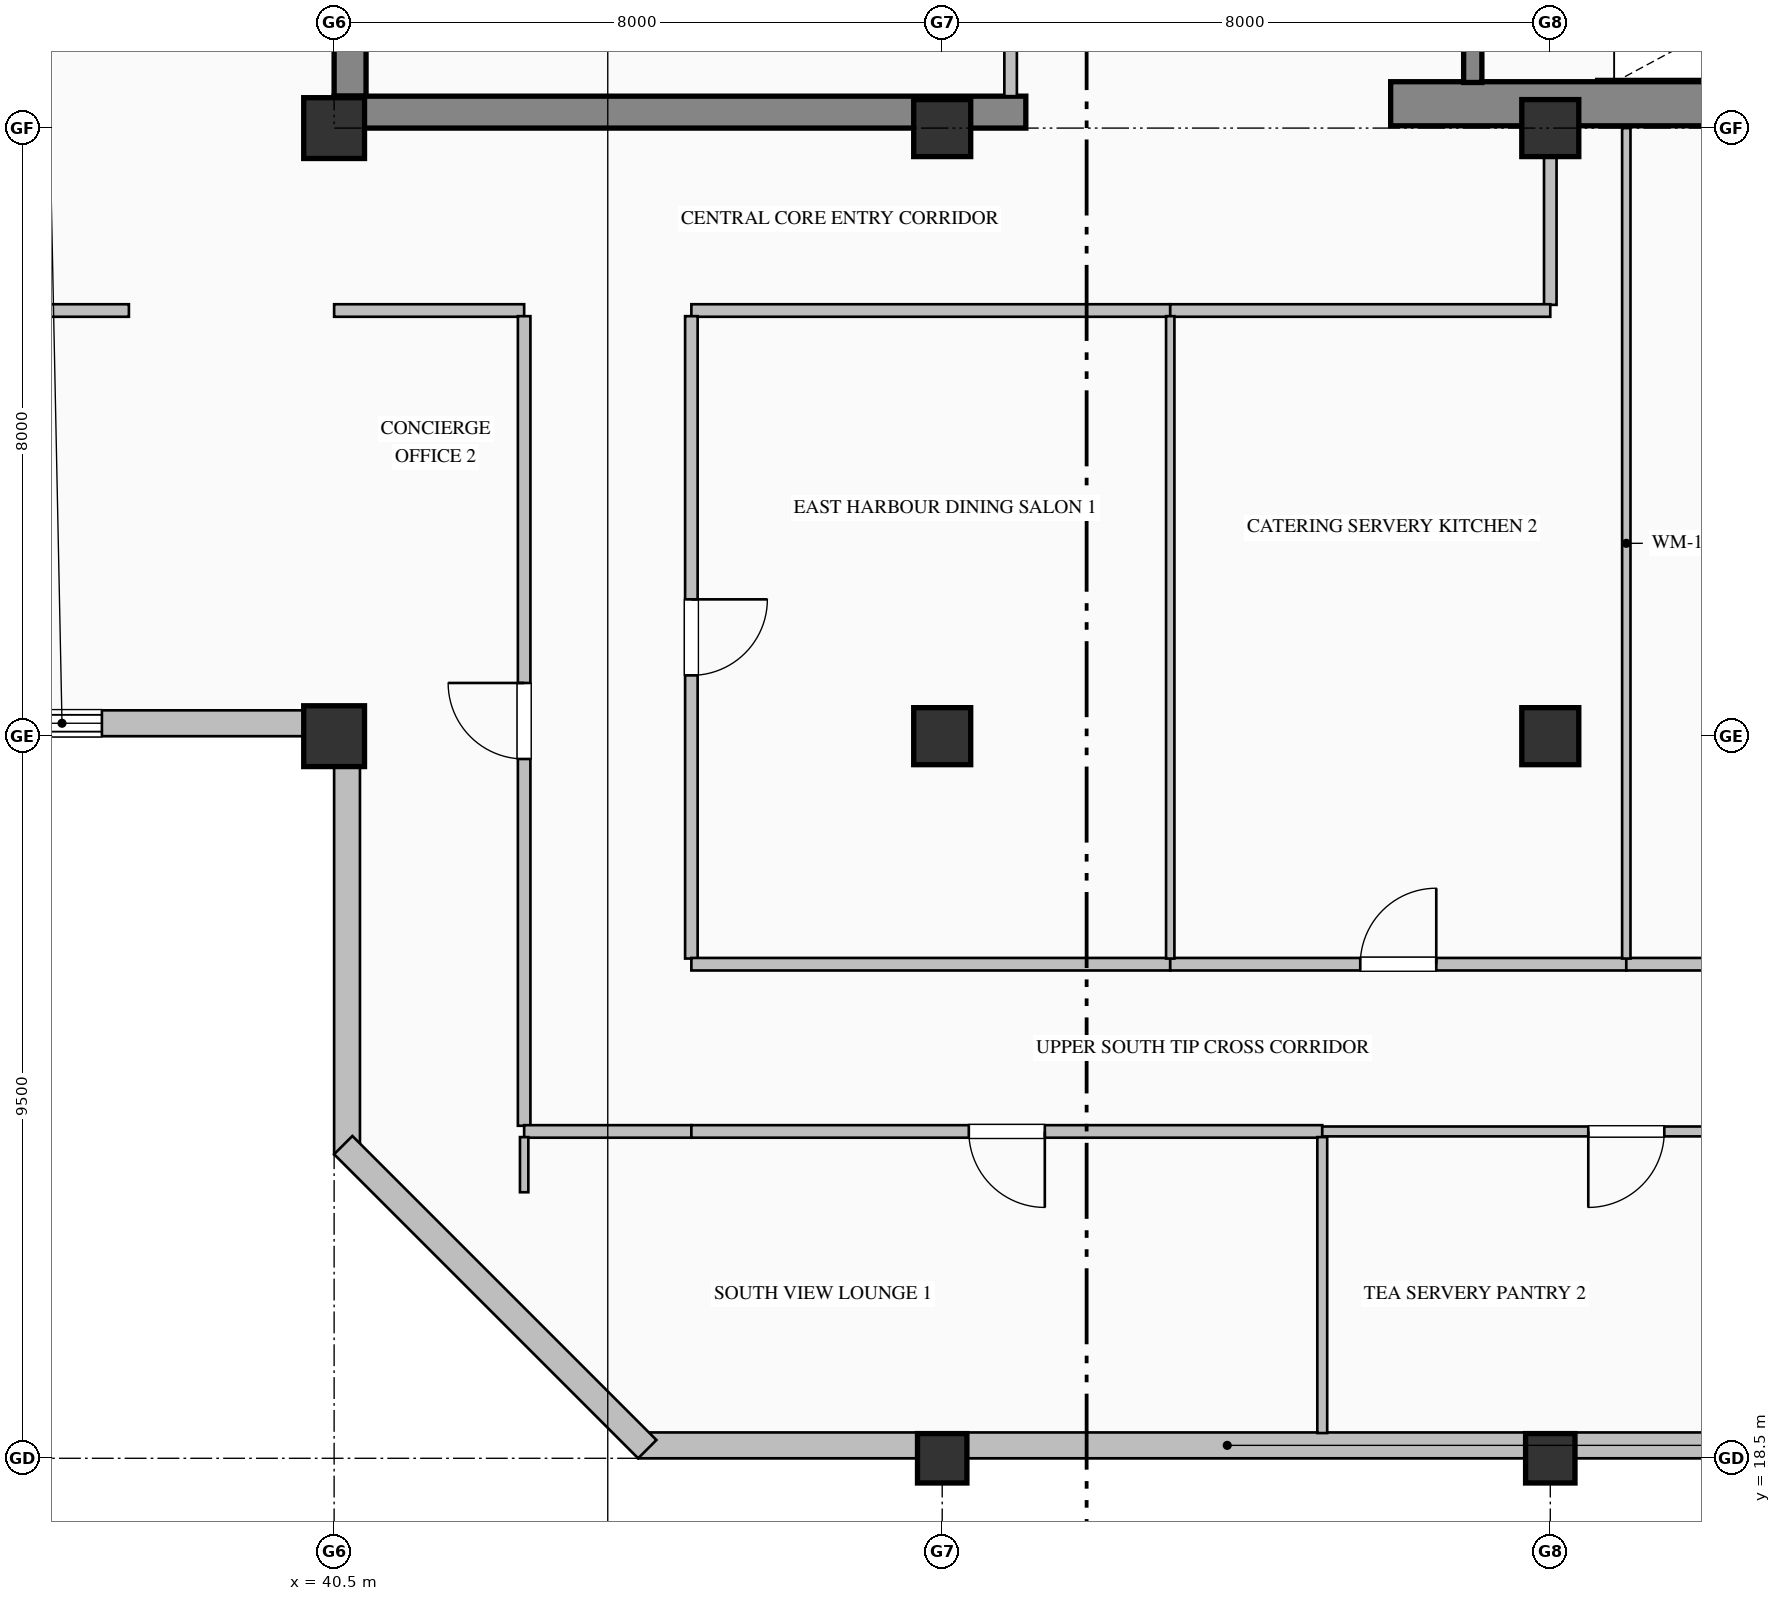
"""IFC4 building model, lengths in metres.
Left out: names, types, materials, properties, quantities, classifications, styles, units other than length and angle.
Written with IfcOpenShell. Run it as: python <this file> out.ifc"""

import sys

from ifc_helpers import new_model, si_unit, direction, frame, frame_2d, origin, origin_2d, place, context, subcontext, project, spatial, rectangle, hollow_rectangle, extrude, element, fill, save


model = new_model("IFC4")
c1 = context("Model", 3, precision=1e-05, world=origin(), true_north=direction((0.0, 1.0)))
c2 = subcontext(c1, "Body", "Model", "MODEL_VIEW")
j1 = project(units=[si_unit("LENGTHUNIT", "METRE"), si_unit("PLANEANGLEUNIT", "RADIAN")], contexts=[c1])
p1 = place(None, origin())
s1 = spatial("IfcSite", under=j1, at=p1, CompositionType="ELEMENT")
p2 = place(p1, origin())
s2 = spatial("IfcBuilding", under=s1, at=p2, CompositionType="ELEMENT")
p3 = place(p2, frame((0.0, 0.0, 335.2)))
s3 = spatial("IfcBuildingStorey", under=s2, at=p3, CompositionType="ELEMENT", Elevation=335.2)
p4 = place(p3, frame((40.71, 36.42, 0.0), z_axis=(0.0, 0.0, 1.0), x_axis=(0.0, 1.0, 0.0)))
e1 = element("IfcWall", 1, at=p4, inside=s3, PredefinedType="SHEAR", context=c2, shape_type="SweptSolid", body=[
    extrude(rectangle(XDim=7.98, YDim=0.42, at=frame_2d((3.99, 0.0))), origin(), (0.0, 0.0, 1.0), 3.785),
])
p5 = place(p3, frame((40.5, 36.21, 0.0), z_axis=(0.0, 0.0, 1.0), x_axis=(1.0, 0.0, 0.0)))
e2 = element("IfcWall", 2, at=p5, inside=s3, PredefinedType="SHEAR", context=c2, shape_type="SweptSolid", body=[
    extrude(rectangle(XDim=9.1, YDim=0.42, at=frame_2d((4.55, 0.0))), origin(), (0.0, 0.0, 1.0), 3.785),
])
p6 = place(p3, frame((54.4, 36.32, 0.0), z_axis=(0.0, 0.0, 1.0), x_axis=(1.0, 0.0, 0.0)))
e3 = element("IfcWall", 3, at=p6, inside=s3, PredefinedType="SHEAR", context=c2, shape_type="SweptSolid", body=[
    extrude(rectangle(XDim=9.6, YDim=0.58, at=frame_2d((4.8, 0.0))), origin(), (0.0, 0.0, 1.0), 4.0),
])
for number, where, z_axis, x_axis in (
    (4, (40.5, 28.0, 0.0), (0.0, 0.0, 1.0), (1.0, 0.0, 0.0)),
    (5, (40.5, 36.0, 0.0), (0.0, 0.0, 1.0), (1.0, 0.0, 0.0)),
):
    element("IfcColumn", number, at=place(p3, frame(where, z_axis=z_axis, x_axis=x_axis)), inside=s3, PredefinedType="COLUMN", context=c2, shape_type="SweptSolid", body=[
        extrude(hollow_rectangle(XDim=0.8, YDim=0.8, WallThickness=0.032, at=origin_2d()), origin(), (0.0, 0.0, 1.0), 4.0),
    ])
p7 = place(p3, frame((48.5, 18.5, 0.0), z_axis=(0.0, 0.0, 1.0), x_axis=(1.0, 0.0, 0.0)))
e6 = element("IfcColumn", 6, at=p7, inside=s3, PredefinedType="COLUMN", context=c2, shape_type="SweptSolid", body=[
    extrude(hollow_rectangle(XDim=0.65, YDim=0.65, WallThickness=0.028, at=origin_2d()), origin(), (0.0, 0.0, 1.0), 4.0),
])
for number, where, z_axis, x_axis in (
    (7, (48.5, 28.0, 0.0), (0.0, 0.0, 1.0), (1.0, 0.0, 0.0)),
    (8, (48.5, 36.0, 0.0), (0.0, 0.0, 1.0), (1.0, 0.0, 0.0)),
):
    element("IfcColumn", number, at=place(p3, frame(where, z_axis=z_axis, x_axis=x_axis)), inside=s3, PredefinedType="COLUMN", context=c2, shape_type="SweptSolid", body=[
        extrude(rectangle(XDim=0.75, YDim=0.75, at=origin_2d()), origin(), (0.0, 0.0, 1.0), 4.0),
    ])
p8 = place(p3, frame((56.5, 18.5, 0.0), z_axis=(0.0, 0.0, 1.0), x_axis=(1.0, 0.0, 0.0)))
e9 = element("IfcColumn", 9, at=p8, inside=s3, PredefinedType="COLUMN", context=c2, shape_type="SweptSolid", body=[
    extrude(hollow_rectangle(XDim=0.65, YDim=0.65, WallThickness=0.028, at=origin_2d()), origin(), (0.0, 0.0, 1.0), 4.0),
])
for number, where, z_axis, x_axis in (
    (10, (56.5, 28.0, 0.0), (0.0, 0.0, 1.0), (1.0, 0.0, 0.0)),
    (11, (56.5, 36.0, 0.0), (0.0, 0.0, 1.0), (1.0, 0.0, 0.0)),
):
    element("IfcColumn", number, at=place(p3, frame(where, z_axis=z_axis, x_axis=x_axis)), inside=s3, PredefinedType="COLUMN", context=c2, shape_type="SweptSolid", body=[
        extrude(rectangle(XDim=0.75, YDim=0.75, at=origin_2d()), origin(), (0.0, 0.0, 1.0), 4.0),
    ])
p9 = place(p3, frame((40.67, 22.5, 0.0), z_axis=(0.0, 0.0, 1.0), x_axis=(0.0, 1.0, 0.0)))
e12 = element("IfcWall", 12, at=p9, inside=s3, PredefinedType="SOLIDWALL", context=c2, shape_type="SweptSolid", body=[
    extrude(rectangle(XDim=5.84, YDim=0.34, at=frame_2d((2.92, 0.0))), origin(), (0.0, 0.0, 1.0), 3.185),
])
p10 = place(p3, frame((40.52, 28.17, 0.0), z_axis=(0.0, 0.0, 1.0), x_axis=(-1.0, 0.0, 0.0)))
e13 = element("IfcWall", 13, at=p10, inside=s3, PredefinedType="SOLIDWALL", context=c2, shape_type="SweptSolid", body=[
    extrude(rectangle(XDim=20.02, YDim=0.34, at=frame_2d((10.01, 0.0))), origin(), (0.0, 0.0, 1.0), 3.185),
])
p11 = place(p10, frame((3.075, 0.0, 0.8)))
e14 = element("IfcOpeningElement", 14, at=p11, cuts=e13, PredefinedType="OPENING", context=c2, shape_type="SweptSolid", body=[
    extrude(rectangle(XDim=1.05, YDim=2.15, at=frame_2d((0.525, 1.075))), frame((0.0, 0.18, 0.0), z_axis=(0.0, -1.0, 0.0), x_axis=(1.0, 0.0, 0.0)), (0.0, 0.0, 1.0), 0.36),
])
p12 = place(p10, frame((10.325, 0.0, 0.9)))
e15 = element("IfcOpeningElement", 15, at=p12, cuts=e13, PredefinedType="OPENING", context=c2, shape_type="SweptSolid", body=[
    extrude(rectangle(XDim=0.95, YDim=1.85, at=frame_2d((0.475, 0.925))), frame((0.0, 0.18, 0.0), z_axis=(0.0, -1.0, 0.0), x_axis=(1.0, 0.0, 0.0)), (0.0, 0.0, 1.0), 0.36),
])
p13 = place(p10, frame((13.875, 0.0, 0.8)))
e16 = element("IfcOpeningElement", 16, at=p13, cuts=e13, PredefinedType="OPENING", context=c2, shape_type="SweptSolid", body=[
    extrude(rectangle(XDim=1.05, YDim=2.15, at=frame_2d((0.525, 1.075))), frame((0.0, 0.18, 0.0), z_axis=(0.0, -1.0, 0.0), x_axis=(1.0, 0.0, 0.0)), (0.0, 0.0, 1.0), 0.36),
])
p14 = place(p3, frame((60.0, 18.67, 0.0), z_axis=(0.0, 0.0, 1.0), x_axis=(-1.0, 0.0, 0.0)))
e17 = element("IfcWall", 17, at=p14, inside=s3, PredefinedType="SOLIDWALL", context=c2, shape_type="SweptSolid", body=[
    extrude(rectangle(XDim=15.5, YDim=0.34, at=frame_2d((7.75, 0.0))), origin(), (0.0, 0.0, 1.0), 3.335),
])
p15 = place(p3, frame((44.62, 18.62, 0.0), z_axis=(0.0, 0.0, 1.0), x_axis=(-0.707106781187, 0.707106781187, 0.0)))
e18 = element("IfcWall", 18, at=p15, inside=s3, PredefinedType="SOLIDWALL", context=c2, shape_type="SweptSolid", body=[
    extrude(rectangle(XDim=5.657, YDim=0.34, at=frame_2d((2.828, 0.0))), origin(), (0.0, 0.0, 1.0), 3.785),
])
p16 = place(p3, frame((55.48, 39.75, 0.0), z_axis=(0.0, 0.0, 1.0), x_axis=(0.0, -1.0, 0.0)))
e19 = element("IfcWall", 19, at=p16, inside=s3, PredefinedType="SOLIDWALL", context=c2, shape_type="SweptSolid", body=[
    extrude(rectangle(XDim=3.15, YDim=0.24, at=frame_2d((1.575, 0.0))), origin(), (0.0, 0.0, 1.0), 4.0),
])
p17 = place(p16, frame((1.0, 0.0, 0.0)))
e20 = element("IfcOpeningElement", 20, at=p17, cuts=e19, PredefinedType="OPENING", context=c2, shape_type="SweptSolid", body=[
    extrude(rectangle(XDim=1.15, YDim=2.2, at=frame_2d((0.575, 1.1))), frame((0.0, 0.13, 0.0), z_axis=(0.0, -1.0, 0.0), x_axis=(1.0, 0.0, 0.0)), (0.0, 0.0, 1.0), 0.26),
])
p18 = place(p3, frame((49.4, 36.42, 0.0), z_axis=(0.0, 0.0, 1.0), x_axis=(0.0, 1.0, 0.0)))
e21 = element("IfcWall", 21, at=p18, inside=s3, PredefinedType="PARTITIONING", context=c2, shape_type="SweptSolid", body=[
    extrude(rectangle(XDim=3.893, YDim=0.165, at=frame_2d((1.947, 0.0))), origin(), (0.0, 0.0, 1.0), 3.027),
])
p19 = place(p18, frame((1.497, 0.0, 0.0)))
e22 = element("IfcOpeningElement", 22, at=p19, cuts=e21, PredefinedType="OPENING", context=c2, shape_type="SweptSolid", body=[
    extrude(rectangle(XDim=0.9, YDim=2.15, at=frame_2d((0.45, 1.075))), frame((0.0, 0.093, 0.0), z_axis=(0.0, -1.0, 0.0), x_axis=(1.0, 0.0, 0.0)), (0.0, 0.0, 1.0), 0.185),
])
p20 = place(p3, frame((37.8, 33.6, 0.0), z_axis=(0.0, 0.0, 1.0), x_axis=(-1.0, 0.0, 0.0)))
e23 = element("IfcWall", 23, at=p20, inside=s3, PredefinedType="PARTITIONING", context=c2, shape_type="SweptSolid", body=[
    extrude(rectangle(XDim=2.4, YDim=0.165, at=frame_2d((1.2, 0.0))), origin(), (0.0, 0.0, 1.0), 3.785),
])
p21 = place(p3, frame((51.5, 33.6, 0.0), z_axis=(0.0, 0.0, 1.0), x_axis=(-1.0, 0.0, 0.0)))
e24 = element("IfcWall", 24, at=p21, inside=s3, PredefinedType="PARTITIONING", context=c2, shape_type="SweptSolid", body=[
    extrude(rectangle(XDim=6.3, YDim=0.165, at=frame_2d((3.15, 0.0))), origin(), (0.0, 0.0, 1.0), 3.785),
])
p22 = place(p3, frame((56.5, 36.0, 0.0), z_axis=(0.0, 0.0, 1.0), x_axis=(0.0, -1.0, 0.0)))
e25 = element("IfcWall", 25, at=p22, inside=s3, PredefinedType="PARTITIONING", context=c2, shape_type="SweptSolid", body=[
    extrude(rectangle(XDim=2.325, YDim=0.165, at=frame_2d((1.163, 0.0))), origin(), (0.0, 0.0, 1.0), 3.177),
])
p23 = place(p3, frame((56.5, 33.6, 0.0), z_axis=(0.0, 0.0, 1.0), x_axis=(-1.0, 0.0, 0.0)))
e26 = element("IfcWall", 26, at=p23, inside=s3, PredefinedType="PARTITIONING", context=c2, shape_type="SweptSolid", body=[
    extrude(rectangle(XDim=5.0, YDim=0.165, at=frame_2d((2.5, 0.0))), origin(), (0.0, 0.0, 1.0), 3.785),
])
p24 = place(p3, frame((43.0, 33.6, 0.0), z_axis=(0.0, 0.0, 1.0), x_axis=(-1.0, 0.0, 0.0)))
e27 = element("IfcWall", 27, at=p24, inside=s3, PredefinedType="PARTITIONING", context=c2, shape_type="SweptSolid", body=[
    extrude(rectangle(XDim=2.5, YDim=0.165, at=frame_2d((1.25, 0.0))), origin(), (0.0, 0.0, 1.0), 3.785),
])
p25 = place(p3, frame((45.2, 33.525, 0.0), z_axis=(0.0, 0.0, 1.0), x_axis=(0.0, -1.0, 0.0)))
e28 = element("IfcWall", 28, at=p25, inside=s3, PredefinedType="PARTITIONING", context=c2, shape_type="SweptSolid", body=[
    extrude(rectangle(XDim=8.451, YDim=0.165, at=frame_2d((4.226, 0.0))), origin(), (0.0, 0.0, 1.0), 3.785),
])
p26 = place(p25, frame((3.726, 0.0, 0.0)))
e29 = element("IfcOpeningElement", 29, at=p26, cuts=e28, PredefinedType="OPENING", context=c2, shape_type="SweptSolid", body=[
    extrude(rectangle(XDim=1.0, YDim=2.15, at=frame_2d((0.5, 1.075))), frame((0.0, 0.093, 0.0), z_axis=(0.0, -1.0, 0.0), x_axis=(1.0, 0.0, 0.0)), (0.0, 0.0, 1.0), 0.185),
])
p27 = place(p3, frame((43.0, 22.875, 0.0), z_axis=(0.0, 0.0, 1.0), x_axis=(0.0, 1.0, 0.0)))
e30 = element("IfcWall", 30, at=p27, inside=s3, PredefinedType="PARTITIONING", context=c2, shape_type="SweptSolid", body=[
    extrude(rectangle(XDim=10.651, YDim=0.165, at=frame_2d((5.325, 0.0))), origin(), (0.0, 0.0, 1.0), 3.785),
])
p28 = place(p27, frame((4.825, 0.0, 0.0)))
e31 = element("IfcOpeningElement", 31, at=p28, cuts=e30, PredefinedType="OPENING", context=c2, shape_type="SweptSolid", body=[
    extrude(rectangle(XDim=1.0, YDim=2.15, at=frame_2d((0.5, 1.075))), frame((0.0, 0.093, 0.0), z_axis=(0.0, -1.0, 0.0), x_axis=(1.0, 0.0, 0.0)), (0.0, 0.0, 1.0), 0.185),
])
p29 = place(p3, frame((45.2, 22.8, 0.0), z_axis=(0.0, 0.0, 1.0), x_axis=(-1.0, 0.0, 0.0)))
e32 = element("IfcWall", 32, at=p29, inside=s3, PredefinedType="PARTITIONING", context=c2, shape_type="SweptSolid", body=[
    extrude(rectangle(XDim=2.2, YDim=0.165, at=frame_2d((1.1, 0.0))), origin(), (0.0, 0.0, 1.0), 3.785),
])
p30 = place(p3, frame((45.2, 25.0, 0.0), z_axis=(0.0, 0.0, 1.0), x_axis=(1.0, 0.0, 0.0)))
e33 = element("IfcWall", 33, at=p30, inside=s3, PredefinedType="PARTITIONING", context=c2, shape_type="SweptSolid", body=[
    extrude(rectangle(XDim=6.3, YDim=0.165, at=frame_2d((3.15, 0.0))), origin(), (0.0, 0.0, 1.0), 3.785),
])
p31 = place(p3, frame((51.5, 25.0, 0.0), z_axis=(0.0, 0.0, 1.0), x_axis=(1.0, 0.0, 0.0)))
e34 = element("IfcWall", 34, at=p31, inside=s3, PredefinedType="PARTITIONING", context=c2, shape_type="SweptSolid", body=[
    extrude(rectangle(XDim=6.0, YDim=0.165, at=frame_2d((3.0, 0.0))), origin(), (0.0, 0.0, 1.0), 3.785),
])
p32 = place(p31, frame((2.5, 0.0, 0.0)))
e35 = element("IfcOpeningElement", 35, at=p32, cuts=e34, PredefinedType="OPENING", context=c2, shape_type="SweptSolid", body=[
    extrude(rectangle(XDim=1.0, YDim=2.15, at=frame_2d((0.5, 1.075))), frame((0.0, 0.093, 0.0), z_axis=(0.0, -1.0, 0.0), x_axis=(1.0, 0.0, 0.0)), (0.0, 0.0, 1.0), 0.185),
])
p33 = place(p3, frame((57.5, 25.0, 0.0), z_axis=(0.0, 0.0, 1.0), x_axis=(1.0, 0.0, 0.0)))
e36 = element("IfcWall", 36, at=p33, inside=s3, PredefinedType="PARTITIONING", context=c2, shape_type="SweptSolid", body=[
    extrude(rectangle(XDim=4.0, YDim=0.165, at=frame_2d((2.0, 0.0))), origin(), (0.0, 0.0, 1.0), 3.785),
])
p34 = place(p33, frame((1.5, 0.0, 0.0)))
e37 = element("IfcOpeningElement", 37, at=p34, cuts=e36, PredefinedType="OPENING", context=c2, shape_type="SweptSolid", body=[
    extrude(rectangle(XDim=1.0, YDim=2.15, at=frame_2d((0.5, 1.075))), frame((0.0, 0.093, 0.0), z_axis=(0.0, -1.0, 0.0), x_axis=(1.0, 0.0, 0.0)), (0.0, 0.0, 1.0), 0.185),
])
p35 = place(p3, frame((53.5, 22.8, 0.0), z_axis=(0.0, 0.0, 1.0), x_axis=(-1.0, 0.0, 0.0)))
e38 = element("IfcWall", 38, at=p35, inside=s3, PredefinedType="PARTITIONING", context=c2, shape_type="SweptSolid", body=[
    extrude(rectangle(XDim=8.3, YDim=0.165, at=frame_2d((4.15, 0.0))), origin(), (0.0, 0.0, 1.0), 3.785),
])
p36 = place(p35, frame((3.65, 0.0, 0.0)))
e39 = element("IfcOpeningElement", 39, at=p36, cuts=e38, PredefinedType="OPENING", context=c2, shape_type="SweptSolid", body=[
    extrude(rectangle(XDim=1.0, YDim=2.15, at=frame_2d((0.5, 1.075))), frame((0.0, 0.093, 0.0), z_axis=(0.0, -1.0, 0.0), x_axis=(1.0, 0.0, 0.0)), (0.0, 0.0, 1.0), 0.185),
])
p37 = place(p3, frame((61.5, 22.8, 0.0), z_axis=(0.0, 0.0, 1.0), x_axis=(-1.0, 0.0, 0.0)))
e40 = element("IfcWall", 40, at=p37, inside=s3, PredefinedType="PARTITIONING", context=c2, shape_type="SweptSolid", body=[
    extrude(rectangle(XDim=8.0, YDim=0.13, at=frame_2d((4.0, 0.0))), origin(), (0.0, 0.0, 1.0), 3.785),
])
p38 = place(p37, frame((3.5, 0.0, 0.0)))
e41 = element("IfcOpeningElement", 41, at=p38, cuts=e40, PredefinedType="OPENING", context=c2, shape_type="SweptSolid", body=[
    extrude(rectangle(XDim=1.0, YDim=2.15, at=frame_2d((0.5, 1.075))), frame((0.0, 0.075, 0.0), z_axis=(0.0, -1.0, 0.0), x_axis=(1.0, 0.0, 0.0)), (0.0, 0.0, 1.0), 0.15),
])
p39 = place(p3, frame((51.5, 33.525, 0.0), z_axis=(0.0, 0.0, 1.0), x_axis=(0.0, -1.0, 0.0)))
e42 = element("IfcWall", 42, at=p39, inside=s3, PredefinedType="MOVABLE", context=c2, shape_type="SweptSolid", body=[
    extrude(rectangle(XDim=8.451, YDim=0.11, at=frame_2d((4.226, 0.0))), origin(), (0.0, 0.0, 1.0), 3.785),
])
p40 = place(p3, frame((57.5, 36.0, 0.0), z_axis=(0.0, 0.0, 1.0), x_axis=(0.0, -1.0, 0.0)))
e43 = element("IfcWall", 43, at=p40, inside=s3, PredefinedType="MOVABLE", context=c2, shape_type="SweptSolid", body=[
    extrude(rectangle(XDim=10.926, YDim=0.11, at=frame_2d((5.463, 0.0))), origin(), (0.0, 0.0, 1.0), 3.785),
])
p41 = place(p3, frame((43.0, 22.726, 0.0), z_axis=(0.0, 0.0, 1.0), x_axis=(0.0, -1.0, 0.0)))
e44 = element("IfcWall", 44, at=p41, inside=s3, PredefinedType="MOVABLE", context=c2, shape_type="SweptSolid", body=[
    extrude(rectangle(XDim=0.726, YDim=0.11, at=frame_2d((0.363, 0.0))), origin(), (0.0, 0.0, 1.0), 3.785),
])
p42 = place(p3, frame((53.5, 22.726, 0.0), z_axis=(0.0, 0.0, 1.0), x_axis=(0.0, -1.0, 0.0)))
e45 = element("IfcWall", 45, at=p42, inside=s3, PredefinedType="PARTITIONING", context=c2, shape_type="SweptSolid", body=[
    extrude(rectangle(XDim=3.894, YDim=0.13, at=frame_2d((1.947, 0.0))), origin(), (0.0, 0.0, 1.0), 3.785),
])
p43 = place(p11, origin())
e46 = element("IfcWindow", 46, at=p43, inside=s3, PartitioningType="SINGLE_PANEL", PredefinedType="WINDOW", context=c2, shape_type="SweptSolid", body=[
    extrude(rectangle(XDim=1.05, YDim=2.15, at=frame_2d((0.525, 1.075))), frame((0.0, 0.15, 0.0), z_axis=(0.0, -1.0, 0.0), x_axis=(1.0, 0.0, 0.0)), (0.0, 0.0, 1.0), 0.06),
])
fill(e14, e46)
p44 = place(p26, origin())
e47 = element("IfcDoor", 47, at=p44, inside=s3, OperationType="SINGLE_SWING_LEFT", PredefinedType="DOOR", context=c2, shape_type="SweptSolid", body=[
    extrude(rectangle(XDim=1.0, YDim=2.15, at=frame_2d((0.5, 1.075))), frame((0.0, 0.025, 0.0), z_axis=(0.0, -1.0, 0.0), x_axis=(1.0, 0.0, 0.0)), (0.0, 0.0, 1.0), 0.05),
])
fill(e29, e47)
p45 = place(p32, origin())
e48 = element("IfcDoor", 48, at=p45, inside=s3, OperationType="SINGLE_SWING_RIGHT", PredefinedType="DOOR", context=c2, shape_type="SweptSolid", body=[
    extrude(rectangle(XDim=1.0, YDim=2.15, at=frame_2d((0.5, 1.075))), frame((0.0, 0.025, 0.0), z_axis=(0.0, -1.0, 0.0), x_axis=(1.0, 0.0, 0.0)), (0.0, 0.0, 1.0), 0.05),
])
fill(e35, e48)
p46 = place(p28, origin())
e49 = element("IfcDoor", 49, at=p46, inside=s3, OperationType="SINGLE_SWING_RIGHT", PredefinedType="DOOR", context=c2, shape_type="SweptSolid", body=[
    extrude(rectangle(XDim=1.0, YDim=2.15, at=frame_2d((0.5, 1.075))), frame((0.0, 0.025, 0.0), z_axis=(0.0, -1.0, 0.0), x_axis=(1.0, 0.0, 0.0)), (0.0, 0.0, 1.0), 0.05),
])
fill(e31, e49)
p47 = place(p36, origin())
e50 = element("IfcDoor", 50, at=p47, inside=s3, OperationType="SINGLE_SWING_LEFT", PredefinedType="DOOR", context=c2, shape_type="SweptSolid", body=[
    extrude(rectangle(XDim=1.0, YDim=2.15, at=frame_2d((0.5, 1.075))), frame((0.0, 0.025, 0.0), z_axis=(0.0, -1.0, 0.0), x_axis=(1.0, 0.0, 0.0)), (0.0, 0.0, 1.0), 0.05),
])
fill(e39, e50)
p48 = place(p38, origin())
e51 = element("IfcDoor", 51, at=p48, inside=s3, OperationType="SINGLE_SWING_RIGHT", PredefinedType="DOOR", context=c2, shape_type="SweptSolid", body=[
    extrude(rectangle(XDim=1.0, YDim=2.15, at=frame_2d((0.5, 1.075))), frame((0.0, 0.025, 0.0), z_axis=(0.0, -1.0, 0.0), x_axis=(1.0, 0.0, 0.0)), (0.0, 0.0, 1.0), 0.05),
])
fill(e41, e51)
save(model, sys.argv[1])
